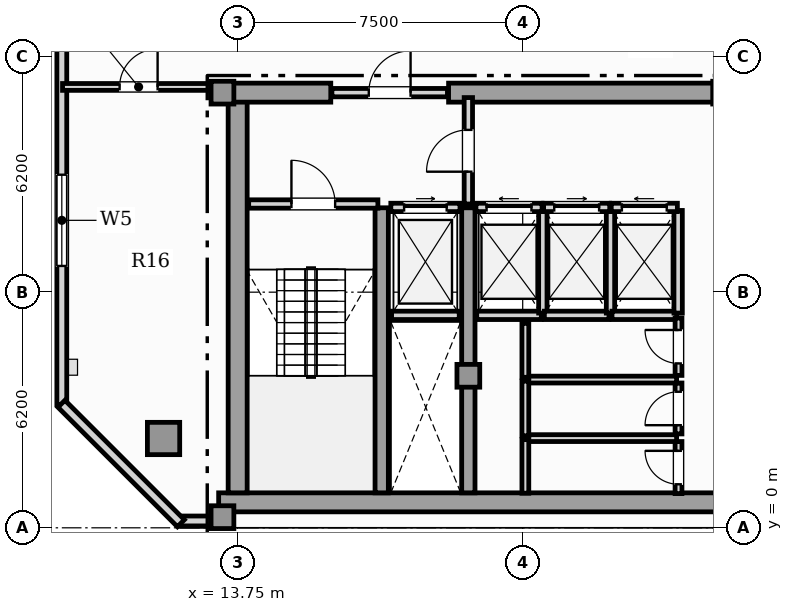
"""IFC4 building model, lengths in metres.
Left out: names, types, materials, properties, quantities, classifications, styles, units other than length and angle.
Written with IfcOpenShell. Run it as: python <this file> out.ifc"""

import sys

from ifc_helpers import new_model, si_unit, direction, frame, frame_2d, origin, origin_2d, place, context, subcontext, project, spatial, rectangle, hollow_rectangle, extrude, element, fill, save


model = new_model("IFC4")
c1 = context("Model", 3, precision=1e-05, world=origin(), true_north=direction((0.0, 1.0)))
c2 = subcontext(c1, "Body", "Model", "MODEL_VIEW")
j1 = project(units=[si_unit("LENGTHUNIT", "METRE"), si_unit("PLANEANGLEUNIT", "RADIAN")], contexts=[c1])
p1 = place(None, origin())
s1 = spatial("IfcSite", under=j1, at=p1, CompositionType="ELEMENT")
p2 = place(p1, origin())
s2 = spatial("IfcBuilding", under=s1, at=p2, CompositionType="ELEMENT")
p3 = place(p2, frame((0.0, 0.0, 316.9)))
s3 = spatial("IfcBuildingStorey", under=s2, at=p3, CompositionType="ELEMENT", Elevation=316.9)
p4 = place(p3, frame((13.25, 0.67, 0.0), z_axis=(0.0, 0.0, 1.0), x_axis=(1.0, 0.0, 0.0)))
e1 = element("IfcWall", 1, at=p4, inside=s3, PredefinedType="SHEAR", context=c2, shape_type="SweptSolid", body=[
    extrude(rectangle(XDim=31.0, YDim=0.5, at=frame_2d((15.5, 0.0))), origin(), (0.0, 0.0, 1.0), 3.65),
])
p5 = place(p3, frame((13.75, 0.92, 0.0), z_axis=(0.0, 0.0, 1.0), x_axis=(0.0, 1.0, 0.0)))
e2 = element("IfcWall", 2, at=p5, inside=s3, PredefinedType="SHEAR", context=c2, shape_type="SweptSolid", body=[
    extrude(rectangle(XDim=10.53, YDim=0.5, at=frame_2d((5.265, 0.0))), origin(), (0.0, 0.0, 1.0), 3.65),
])
p6 = place(p3, frame((13.25, 11.45, 0.0), z_axis=(0.0, 0.0, 1.0), x_axis=(1.0, 0.0, 0.0)))
e3 = element("IfcWall", 3, at=p6, inside=s3, PredefinedType="SHEAR", context=c2, shape_type="SweptSolid", body=[
    extrude(rectangle(XDim=2.95, YDim=0.5, at=frame_2d((1.475, 0.0))), origin(), (0.0, 0.0, 1.0), 3.65),
])
p7 = place(p3, frame((19.3, 11.45, 0.0), z_axis=(0.0, 0.0, 1.0), x_axis=(1.0, 0.0, 0.0)))
e4 = element("IfcWall", 4, at=p7, inside=s3, PredefinedType="SHEAR", context=c2, shape_type="SweptSolid", body=[
    extrude(rectangle(XDim=7.3, YDim=0.5, at=frame_2d((3.65, 0.0))), origin(), (0.0, 0.0, 1.0), 3.65),
])
for number, where, z_axis, x_axis in (
    (5, (17.54, 0.92, 0.0), (0.0, 0.0, 1.0), (0.0, 1.0, 0.0)),
    (6, (19.82, 0.92, 0.0), (0.0, 0.0, 1.0), (0.0, 1.0, 0.0)),
):
    element("IfcWall", number, at=place(p3, frame(where, z_axis=z_axis, x_axis=x_axis)), inside=s3, PredefinedType="SHEAR", context=c2, shape_type="SweptSolid", body=[
        extrude(rectangle(XDim=7.5, YDim=0.35, at=frame_2d((3.75, 0.0))), origin(), (0.0, 0.0, 1.0), 3.65),
    ])
for number, where, z_axis, x_axis in (
    (7, (13.35, 0.28, 0.0), (0.0, 0.0, 1.0), (1.0, 0.0, 0.0)),
    (8, (13.35, 11.45, 0.0), (0.0, 0.0, 1.0), (1.0, 0.0, 0.0)),
    (9, (19.82, 4.0, 0.0), (0.0, 0.0, 1.0), (1.0, 0.0, 0.0)),
    (10, (26.55, 11.45, 0.0), (0.0, 0.0, 1.0), (1.0, 0.0, 0.0)),
):
    element("IfcColumn", number, at=place(p3, frame(where, z_axis=z_axis, x_axis=x_axis)), inside=s3, PredefinedType="COLUMN", context=c2, shape_type="SweptSolid", body=[
        extrude(rectangle(XDim=0.6, YDim=0.6, at=origin_2d()), origin(), (0.0, 0.0, 1.0), 3.85),
    ])
p8 = place(p3, frame((11.8, 2.35, 0.0), z_axis=(0.0, 0.0, 1.0), x_axis=(1.0, 0.0, 0.0)))
e11 = element("IfcColumn", 11, at=p8, inside=s3, PredefinedType="USERDEFINED", context=c2, shape_type="SweptSolid", body=[
    extrude(hollow_rectangle(XDim=0.85, YDim=0.85, WallThickness=0.05, at=origin_2d()), origin(), (0.0, 0.0, 1.0), 3.85),
])
p9 = place(p3, frame((12.233, 0.18, 0.0), z_axis=(0.0, 0.0, 1.0), x_axis=(1.0, 0.0, 0.0)))
e12 = element("IfcWall", 12, at=p9, inside=s3, PredefinedType="SOLIDWALL", context=c2, shape_type="SweptSolid", body=[
    extrude(rectangle(XDim=1.017, YDim=0.26, at=frame_2d((0.509, 0.0))), origin(), (0.0, 0.0, 1.0), 3.65),
])
p10 = place(p3, frame((9.123, 29.642, 0.0), z_axis=(0.0, 0.0, 1.0), x_axis=(0.0, -1.0, 0.0)))
e13 = element("IfcWall", 13, at=p10, inside=s3, PredefinedType="SOLIDWALL", context=c2, shape_type="SweptSolid", body=[
    extrude(rectangle(XDim=26.402, YDim=0.26, at=frame_2d((13.201, 0.0))), origin(), (0.0, 0.0, 1.0), 3.65),
])
p11 = place(p10, frame((20.352, 0.0, 0.85)))
e14 = element("IfcOpeningElement", 14, at=p11, cuts=e13, PredefinedType="OPENING", context=c2, shape_type="SweptSolid", body=[
    extrude(rectangle(XDim=2.4, YDim=2.0, at=frame_2d((1.2, 1.0))), frame((0.0, 0.14, 0.0), z_axis=(0.0, -1.0, 0.0), x_axis=(1.0, 0.0, 0.0)), (0.0, 0.0, 1.0), 0.28),
])
p12 = place(p10, frame((10.19, 0.0, 0.88)))
e15 = element("IfcOpeningElement", 15, at=p12, cuts=e13, PredefinedType="OPENING", context=c2, shape_type="SweptSolid", body=[
    extrude(rectangle(XDim=1.65, YDim=2.0, at=frame_2d((0.825, 1.0))), frame((0.0, 0.14, 0.0), z_axis=(0.0, -1.0, 0.0), x_axis=(1.0, 0.0, 0.0)), (0.0, 0.0, 1.0), 0.28),
])
p13 = place(p10, frame((7.34, 0.0, 0.88)))
e16 = element("IfcOpeningElement", 16, at=p13, cuts=e13, PredefinedType="OPENING", context=c2, shape_type="SweptSolid", body=[
    extrude(rectangle(XDim=1.65, YDim=2.0, at=frame_2d((0.825, 1.0))), frame((0.0, 0.14, 0.0), z_axis=(0.0, -1.0, 0.0), x_axis=(1.0, 0.0, 0.0)), (0.0, 0.0, 1.0), 0.28),
])
p14 = place(p10, frame((3.721, 0.0, 0.88)))
e17 = element("IfcOpeningElement", 17, at=p14, cuts=e13, PredefinedType="OPENING", context=c2, shape_type="SweptSolid", body=[
    extrude(rectangle(XDim=1.65, YDim=2.0, at=frame_2d((0.825, 1.0))), frame((0.0, 0.14, 0.0), z_axis=(0.0, -1.0, 0.0), x_axis=(1.0, 0.0, 0.0)), (0.0, 0.0, 1.0), 0.28),
])
p15 = place(p3, frame((9.113, 3.264, 0.0), z_axis=(0.0, 0.0, 1.0), x_axis=(0.707079321262, -0.707134240044, 0.0)))
e18 = element("IfcWall", 18, at=p15, inside=s3, PredefinedType="SOLIDWALL", context=c2, shape_type="SweptSolid", body=[
    extrude(rectangle(XDim=4.446, YDim=0.26, at=frame_2d((2.223, 0.0))), origin(), (0.0, 0.0, 1.0), 3.65),
])
p16 = place(p3, frame((17.8, 5.59, 0.0), z_axis=(0.0, 0.0, 1.0), x_axis=(1.0, 0.0, 0.0)))
e19 = element("IfcWall", 19, at=p16, inside=s3, PredefinedType="SOLIDWALL", context=c2, shape_type="SweptSolid", body=[
    extrude(rectangle(XDim=1.78, YDim=0.22, at=frame_2d((0.89, 0.0))), origin(), (0.0, 0.0, 1.0), 3.65),
])
p17 = place(p3, frame((17.78, 8.43, 0.0), z_axis=(0.0, 0.0, 1.0), x_axis=(1.0, 0.0, 0.0)))
e20 = element("IfcWall", 20, at=p17, inside=s3, PredefinedType="SOLIDWALL", context=c2, shape_type="SweptSolid", body=[
    extrude(rectangle(XDim=1.82, YDim=0.22, at=frame_2d((0.91, 0.0))), origin(), (0.0, 0.0, 1.0), 3.65),
])
p18 = place(p17, frame((0.35, 0.0, 0.0)))
e21 = element("IfcOpeningElement", 21, at=p18, cuts=e20, PredefinedType="OPENING", context=c2, shape_type="SweptSolid", body=[
    extrude(rectangle(XDim=1.12, YDim=2.25, at=frame_2d((0.56, 1.125))), frame((0.0, 0.12, 0.0), z_axis=(0.0, -1.0, 0.0), x_axis=(1.0, 0.0, 0.0)), (0.0, 0.0, 1.0), 0.24),
])
p19 = place(p3, frame((20.04, 5.59, 0.0), z_axis=(0.0, 0.0, 1.0), x_axis=(1.0, 0.0, 0.0)))
e22 = element("IfcWall", 22, at=p19, inside=s3, PredefinedType="SOLIDWALL", context=c2, shape_type="SweptSolid", body=[
    extrude(rectangle(XDim=1.7, YDim=0.22, at=frame_2d((0.85, 0.0))), origin(), (0.0, 0.0, 1.0), 3.65),
])
p20 = place(p3, frame((21.78, 5.65, 0.0), z_axis=(0.0, 0.0, 1.0), x_axis=(0.0, 1.0, 0.0)))
e23 = element("IfcWall", 23, at=p20, inside=s3, PredefinedType="SOLIDWALL", context=c2, shape_type="SweptSolid", body=[
    extrude(rectangle(XDim=2.7, YDim=0.22, at=frame_2d((1.35, 0.0))), origin(), (0.0, 0.0, 1.0), 3.65),
])
p21 = place(p3, frame((20.02, 8.43, 0.0), z_axis=(0.0, 0.0, 1.0), x_axis=(1.0, 0.0, 0.0)))
e24 = element("IfcWall", 24, at=p21, inside=s3, PredefinedType="SOLIDWALL", context=c2, shape_type="SweptSolid", body=[
    extrude(rectangle(XDim=1.74, YDim=0.22, at=frame_2d((0.87, 0.0))), origin(), (0.0, 0.0, 1.0), 3.65),
])
p22 = place(p21, frame((0.28, 0.0, 0.0)))
e25 = element("IfcOpeningElement", 25, at=p22, cuts=e24, PredefinedType="OPENING", context=c2, shape_type="SweptSolid", body=[
    extrude(rectangle(XDim=1.18, YDim=2.2, at=frame_2d((0.59, 1.1))), frame((0.0, 0.12, 0.0), z_axis=(0.0, -1.0, 0.0), x_axis=(1.0, 0.0, 0.0)), (0.0, 0.0, 1.0), 0.24),
])
p23 = place(p3, frame((21.82, 5.59, 0.0), z_axis=(0.0, 0.0, 1.0), x_axis=(1.0, 0.0, 0.0)))
e26 = element("IfcWall", 26, at=p23, inside=s3, PredefinedType="SOLIDWALL", context=c2, shape_type="SweptSolid", body=[
    extrude(rectangle(XDim=1.7, YDim=0.22, at=frame_2d((0.85, 0.0))), origin(), (0.0, 0.0, 1.0), 3.65),
])
p24 = place(p3, frame((23.56, 5.65, 0.0), z_axis=(0.0, 0.0, 1.0), x_axis=(0.0, 1.0, 0.0)))
e27 = element("IfcWall", 27, at=p24, inside=s3, PredefinedType="SOLIDWALL", context=c2, shape_type="SweptSolid", body=[
    extrude(rectangle(XDim=2.7, YDim=0.22, at=frame_2d((1.35, 0.0))), origin(), (0.0, 0.0, 1.0), 3.65),
])
p25 = place(p3, frame((21.8, 8.43, 0.0), z_axis=(0.0, 0.0, 1.0), x_axis=(1.0, 0.0, 0.0)))
e28 = element("IfcWall", 28, at=p25, inside=s3, PredefinedType="SOLIDWALL", context=c2, shape_type="SweptSolid", body=[
    extrude(rectangle(XDim=1.74, YDim=0.22, at=frame_2d((0.87, 0.0))), origin(), (0.0, 0.0, 1.0), 3.65),
])
p26 = place(p25, frame((0.28, 0.0, 0.0)))
e29 = element("IfcOpeningElement", 29, at=p26, cuts=e28, PredefinedType="OPENING", context=c2, shape_type="SweptSolid", body=[
    extrude(rectangle(XDim=1.18, YDim=2.2, at=frame_2d((0.59, 1.1))), frame((0.0, 0.12, 0.0), z_axis=(0.0, -1.0, 0.0), x_axis=(1.0, 0.0, 0.0)), (0.0, 0.0, 1.0), 0.24),
])
p27 = place(p3, frame((23.6, 5.59, 0.0), z_axis=(0.0, 0.0, 1.0), x_axis=(1.0, 0.0, 0.0)))
e30 = element("IfcWall", 30, at=p27, inside=s3, PredefinedType="SOLIDWALL", context=c2, shape_type="SweptSolid", body=[
    extrude(rectangle(XDim=1.7, YDim=0.22, at=frame_2d((0.85, 0.0))), origin(), (0.0, 0.0, 1.0), 3.65),
])
p28 = place(p3, frame((25.34, 5.65, 0.0), z_axis=(0.0, 0.0, 1.0), x_axis=(0.0, 1.0, 0.0)))
e31 = element("IfcWall", 31, at=p28, inside=s3, PredefinedType="SOLIDWALL", context=c2, shape_type="SweptSolid", body=[
    extrude(rectangle(XDim=2.7, YDim=0.22, at=frame_2d((1.35, 0.0))), origin(), (0.0, 0.0, 1.0), 3.65),
])
p29 = place(p3, frame((23.58, 8.43, 0.0), z_axis=(0.0, 0.0, 1.0), x_axis=(1.0, 0.0, 0.0)))
e32 = element("IfcWall", 32, at=p29, inside=s3, PredefinedType="SOLIDWALL", context=c2, shape_type="SweptSolid", body=[
    extrude(rectangle(XDim=1.74, YDim=0.22, at=frame_2d((0.87, 0.0))), origin(), (0.0, 0.0, 1.0), 3.65),
])
p30 = place(p29, frame((0.28, 0.0, 0.0)))
e33 = element("IfcOpeningElement", 33, at=p30, cuts=e32, PredefinedType="OPENING", context=c2, shape_type="SweptSolid", body=[
    extrude(rectangle(XDim=1.18, YDim=2.2, at=frame_2d((0.59, 1.1))), frame((0.0, 0.12, 0.0), z_axis=(0.0, -1.0, 0.0), x_axis=(1.0, 0.0, 0.0)), (0.0, 0.0, 1.0), 0.24),
])
p31 = place(p3, frame((14.04, 8.52, 0.0), z_axis=(0.0, 0.0, 1.0), x_axis=(1.0, 0.0, 0.0)))
e34 = element("IfcWall", 34, at=p31, inside=s3, PredefinedType="SOLIDWALL", context=c2, shape_type="SweptSolid", body=[
    extrude(rectangle(XDim=3.4, YDim=0.22, at=frame_2d((1.7, 0.0))), origin(), (0.0, 0.0, 1.0), 3.65),
])
p32 = place(p31, frame((1.125, 0.0, 0.0)))
e35 = element("IfcOpeningElement", 35, at=p32, cuts=e34, PredefinedType="OPENING", context=c2, shape_type="SweptSolid", body=[
    extrude(rectangle(XDim=1.15, YDim=2.2, at=frame_2d((0.575, 1.1))), frame((0.0, 0.12, 0.0), z_axis=(0.0, -1.0, 0.0), x_axis=(1.0, 0.0, 0.0)), (0.0, 0.0, 1.0), 0.24),
])
p33 = place(p3, frame((19.82, 8.52, 0.0), z_axis=(0.0, 0.0, 1.0), x_axis=(0.0, 1.0, 0.0)))
e36 = element("IfcWall", 36, at=p33, inside=s3, PredefinedType="SOLIDWALL", context=c2, shape_type="SweptSolid", body=[
    extrude(rectangle(XDim=2.8, YDim=0.22, at=frame_2d((1.4, 0.0))), origin(), (0.0, 0.0, 1.0), 3.106),
])
p34 = place(p33, frame((0.85, 0.0, 0.0)))
e37 = element("IfcOpeningElement", 37, at=p34, cuts=e36, PredefinedType="OPENING", context=c2, shape_type="SweptSolid", body=[
    extrude(rectangle(XDim=1.1, YDim=2.2, at=frame_2d((0.55, 1.1))), frame((0.0, 0.12, 0.0), z_axis=(0.0, -1.0, 0.0), x_axis=(1.0, 0.0, 0.0)), (0.0, 0.0, 1.0), 0.24),
])
p35 = place(p3, frame((16.23, 11.45, 0.0), z_axis=(0.0, 0.0, 1.0), x_axis=(1.0, 0.0, 0.0)))
e38 = element("IfcWall", 38, at=p35, inside=s3, PredefinedType="SOLIDWALL", context=c2, shape_type="SweptSolid", body=[
    extrude(rectangle(XDim=3.04, YDim=0.22, at=frame_2d((1.52, 0.0))), origin(), (0.0, 0.0, 1.0), 3.65),
])
p36 = place(p35, frame((0.97, 0.0, 0.0)))
e39 = element("IfcOpeningElement", 39, at=p36, cuts=e38, PredefinedType="OPENING", context=c2, shape_type="SweptSolid", body=[
    extrude(rectangle(XDim=1.1, YDim=2.2, at=frame_2d((0.55, 1.1))), frame((0.0, 0.12, 0.0), z_axis=(0.0, -1.0, 0.0), x_axis=(1.0, 0.0, 0.0)), (0.0, 0.0, 1.0), 0.24),
])
p37 = place(p3, frame((25.35, 0.9, 0.0), z_axis=(0.0, 0.0, 1.0), x_axis=(0.0, 1.0, 0.0)))
e40 = element("IfcWall", 40, at=p37, inside=s3, PredefinedType="PARTITIONING", context=c2, shape_type="SweptSolid", body=[
    extrude(rectangle(XDim=1.37, YDim=0.18, at=frame_2d((0.685, 0.0))), origin(), (0.0, 0.0, 1.0), 3.65),
])
p38 = place(p37, frame((0.245, 0.0, 0.0)))
e41 = element("IfcOpeningElement", 41, at=p38, cuts=e40, PredefinedType="OPENING", context=c2, shape_type="SweptSolid", body=[
    extrude(rectangle(XDim=0.88, YDim=2.05, at=frame_2d((0.44, 1.025))), frame((0.0, 0.1, 0.0), z_axis=(0.0, -1.0, 0.0), x_axis=(1.0, 0.0, 0.0)), (0.0, 0.0, 1.0), 0.2),
])
p39 = place(p3, frame((21.36, 2.36, 0.0), z_axis=(0.0, 0.0, 1.0), x_axis=(1.0, 0.0, 0.0)))
e42 = element("IfcWall", 42, at=p39, inside=s3, PredefinedType="PARTITIONING", context=c2, shape_type="SweptSolid", body=[
    extrude(rectangle(XDim=3.94, YDim=0.18, at=frame_2d((1.97, 0.0))), origin(), (0.0, 0.0, 1.0), 3.65),
])
p40 = place(p3, frame((21.32, 0.91, 0.0), z_axis=(0.0, 0.0, 1.0), x_axis=(0.0, 1.0, 0.0)))
e43 = element("IfcWall", 43, at=p40, inside=s3, PredefinedType="PARTITIONING", context=c2, shape_type="SweptSolid", body=[
    extrude(rectangle(XDim=1.41, YDim=0.18, at=frame_2d((0.705, 0.0))), origin(), (0.0, 0.0, 1.0), 3.65),
])
p41 = place(p3, frame((25.35, 2.47, 0.0), z_axis=(0.0, 0.0, 1.0), x_axis=(0.0, 1.0, 0.0)))
e44 = element("IfcWall", 44, at=p41, inside=s3, PredefinedType="PARTITIONING", context=c2, shape_type="SweptSolid", body=[
    extrude(rectangle(XDim=1.34, YDim=0.18, at=frame_2d((0.67, 0.0))), origin(), (0.0, 0.0, 1.0), 3.65),
])
p42 = place(p41, frame((0.23, 0.0, 0.0)))
e45 = element("IfcOpeningElement", 45, at=p42, cuts=e44, PredefinedType="OPENING", context=c2, shape_type="SweptSolid", body=[
    extrude(rectangle(XDim=0.88, YDim=2.05, at=frame_2d((0.44, 1.025))), frame((0.0, 0.1, 0.0), z_axis=(0.0, -1.0, 0.0), x_axis=(1.0, 0.0, 0.0)), (0.0, 0.0, 1.0), 0.2),
])
p43 = place(p3, frame((21.36, 3.9, 0.0), z_axis=(0.0, 0.0, 1.0), x_axis=(1.0, 0.0, 0.0)))
e46 = element("IfcWall", 46, at=p43, inside=s3, PredefinedType="PARTITIONING", context=c2, shape_type="SweptSolid", body=[
    extrude(rectangle(XDim=3.94, YDim=0.18, at=frame_2d((1.97, 0.0))), origin(), (0.0, 0.0, 1.0), 3.65),
])
p44 = place(p3, frame((21.32, 2.42, 0.0), z_axis=(0.0, 0.0, 1.0), x_axis=(0.0, 1.0, 0.0)))
e47 = element("IfcWall", 47, at=p44, inside=s3, PredefinedType="PARTITIONING", context=c2, shape_type="SweptSolid", body=[
    extrude(rectangle(XDim=1.44, YDim=0.18, at=frame_2d((0.72, 0.0))), origin(), (0.0, 0.0, 1.0), 3.65),
])
p45 = place(p3, frame((25.35, 4.01, 0.0), z_axis=(0.0, 0.0, 1.0), x_axis=(0.0, 1.0, 0.0)))
e48 = element("IfcWall", 48, at=p45, inside=s3, PredefinedType="PARTITIONING", context=c2, shape_type="SweptSolid", body=[
    extrude(rectangle(XDim=1.51, YDim=0.18, at=frame_2d((0.755, 0.0))), origin(), (0.0, 0.0, 1.0), 3.65),
])
p46 = place(p45, frame((0.315, 0.0, 0.0)))
e49 = element("IfcOpeningElement", 49, at=p46, cuts=e48, PredefinedType="OPENING", context=c2, shape_type="SweptSolid", body=[
    extrude(rectangle(XDim=0.88, YDim=2.05, at=frame_2d((0.44, 1.025))), frame((0.0, 0.1, 0.0), z_axis=(0.0, -1.0, 0.0), x_axis=(1.0, 0.0, 0.0)), (0.0, 0.0, 1.0), 0.2),
])
p47 = place(p3, frame((21.32, 3.96, 0.0), z_axis=(0.0, 0.0, 1.0), x_axis=(0.0, 1.0, 0.0)))
e50 = element("IfcWall", 50, at=p47, inside=s3, PredefinedType="PARTITIONING", context=c2, shape_type="SweptSolid", body=[
    extrude(rectangle(XDim=1.42, YDim=0.18, at=frame_2d((0.71, 0.0))), origin(), (0.0, 0.0, 1.0), 3.65),
])
p48 = place(p3, frame((9.143, 11.6, 0.0), z_axis=(0.0, 0.0, 1.0), x_axis=(1.0, 0.0, 0.0)))
e51 = element("IfcWall", 51, at=p48, inside=s3, PredefinedType="PARTITIONING", context=c2, shape_type="SweptSolid", body=[
    extrude(rectangle(XDim=4.002, YDim=0.18, at=frame_2d((2.001, 0.0))), origin(), (0.0, 0.0, 1.0), 3.65),
])
p49 = place(p48, frame((1.501, 0.0, 0.0)))
e52 = element("IfcOpeningElement", 52, at=p49, cuts=e51, PredefinedType="OPENING", context=c2, shape_type="SweptSolid", body=[
    extrude(rectangle(XDim=1.0, YDim=2.15, at=frame_2d((0.5, 1.075))), frame((0.0, 0.1, 0.0), z_axis=(0.0, -1.0, 0.0), x_axis=(1.0, 0.0, 0.0)), (0.0, 0.0, 1.0), 0.2),
])
p50 = place(p11, origin())
e53 = element("IfcWindow", 53, at=p50, inside=s3, PartitioningType="SINGLE_PANEL", PredefinedType="WINDOW", context=c2, shape_type="SweptSolid", body=[
    extrude(rectangle(XDim=2.4, YDim=2.0, at=frame_2d((1.2, 1.0))), frame((0.0, 0.03, 0.0), z_axis=(0.0, -1.0, 0.0), x_axis=(1.0, 0.0, 0.0)), (0.0, 0.0, 1.0), 0.06),
])
fill(e14, e53)
p51 = place(p18, origin())
e54 = element("IfcDoor", 54, at=p51, inside=s3, OperationType="SLIDING_TO_RIGHT", PredefinedType="DOOR", context=c2, shape_type="SweptSolid", body=[
    extrude(rectangle(XDim=1.12, YDim=2.25, at=frame_2d((0.56, 1.125))), frame((0.0, 0.025, 0.0), z_axis=(0.0, -1.0, 0.0), x_axis=(1.0, 0.0, 0.0)), (0.0, 0.0, 1.0), 0.05),
])
fill(e21, e54)
p52 = place(p22, origin())
e55 = element("IfcDoor", 55, at=p52, inside=s3, OperationType="SLIDING_TO_LEFT", PredefinedType="DOOR", context=c2, shape_type="SweptSolid", body=[
    extrude(rectangle(XDim=1.18, YDim=2.2, at=frame_2d((0.59, 1.1))), frame((0.0, 0.025, 0.0), z_axis=(0.0, -1.0, 0.0), x_axis=(1.0, 0.0, 0.0)), (0.0, 0.0, 1.0), 0.05),
])
fill(e25, e55)
p53 = place(p26, origin())
e56 = element("IfcDoor", 56, at=p53, inside=s3, OperationType="SLIDING_TO_RIGHT", PredefinedType="DOOR", context=c2, shape_type="SweptSolid", body=[
    extrude(rectangle(XDim=1.18, YDim=2.2, at=frame_2d((0.59, 1.1))), frame((0.0, 0.025, 0.0), z_axis=(0.0, -1.0, 0.0), x_axis=(1.0, 0.0, 0.0)), (0.0, 0.0, 1.0), 0.05),
])
fill(e29, e56)
p54 = place(p30, origin())
e57 = element("IfcDoor", 57, at=p54, inside=s3, OperationType="SLIDING_TO_LEFT", PredefinedType="DOOR", context=c2, shape_type="SweptSolid", body=[
    extrude(rectangle(XDim=1.18, YDim=2.2, at=frame_2d((0.59, 1.1))), frame((0.0, 0.025, 0.0), z_axis=(0.0, -1.0, 0.0), x_axis=(1.0, 0.0, 0.0)), (0.0, 0.0, 1.0), 0.05),
])
fill(e33, e57)
p55 = place(p32, origin())
e58 = element("IfcDoor", 58, at=p55, inside=s3, OperationType="SINGLE_SWING_LEFT", PredefinedType="DOOR", context=c2, shape_type="SweptSolid", body=[
    extrude(rectangle(XDim=1.15, YDim=2.2, at=frame_2d((0.575, 1.1))), frame((0.0, 0.025, 0.0), z_axis=(0.0, -1.0, 0.0), x_axis=(1.0, 0.0, 0.0)), (0.0, 0.0, 1.0), 0.05),
])
fill(e35, e58)
p56 = place(p34, origin())
e59 = element("IfcDoor", 59, at=p56, inside=s3, OperationType="SINGLE_SWING_LEFT", PredefinedType="DOOR", context=c2, shape_type="SweptSolid", body=[
    extrude(rectangle(XDim=1.1, YDim=2.2, at=frame_2d((0.55, 1.1))), frame((0.0, 0.025, 0.0), z_axis=(0.0, -1.0, 0.0), x_axis=(1.0, 0.0, 0.0)), (0.0, 0.0, 1.0), 0.05),
])
fill(e37, e59)
p57 = place(p36, origin())
e60 = element("IfcDoor", 60, at=p57, inside=s3, OperationType="SINGLE_SWING_RIGHT", PredefinedType="DOOR", context=c2, shape_type="SweptSolid", body=[
    extrude(rectangle(XDim=1.1, YDim=2.2, at=frame_2d((0.55, 1.1))), frame((0.0, 0.025, 0.0), z_axis=(0.0, -1.0, 0.0), x_axis=(1.0, 0.0, 0.0)), (0.0, 0.0, 1.0), 0.05),
])
fill(e39, e60)
p58 = place(p38, origin())
e61 = element("IfcDoor", 61, at=p58, inside=s3, OperationType="SINGLE_SWING_RIGHT", PredefinedType="DOOR", context=c2, shape_type="SweptSolid", body=[
    extrude(rectangle(XDim=0.88, YDim=2.05, at=frame_2d((0.44, 1.025))), frame((0.0, 0.025, 0.0), z_axis=(0.0, -1.0, 0.0), x_axis=(1.0, 0.0, 0.0)), (0.0, 0.0, 1.0), 0.05),
])
fill(e41, e61)
p59 = place(p42, origin())
e62 = element("IfcDoor", 62, at=p59, inside=s3, OperationType="SINGLE_SWING_LEFT", PredefinedType="DOOR", context=c2, shape_type="SweptSolid", body=[
    extrude(rectangle(XDim=0.88, YDim=2.05, at=frame_2d((0.44, 1.025))), frame((0.0, 0.025, 0.0), z_axis=(0.0, -1.0, 0.0), x_axis=(1.0, 0.0, 0.0)), (0.0, 0.0, 1.0), 0.05),
])
fill(e45, e62)
p60 = place(p46, origin())
e63 = element("IfcDoor", 63, at=p60, inside=s3, OperationType="SINGLE_SWING_RIGHT", PredefinedType="DOOR", context=c2, shape_type="SweptSolid", body=[
    extrude(rectangle(XDim=0.88, YDim=2.05, at=frame_2d((0.44, 1.025))), frame((0.0, 0.025, 0.0), z_axis=(0.0, -1.0, 0.0), x_axis=(1.0, 0.0, 0.0)), (0.0, 0.0, 1.0), 0.05),
])
fill(e49, e63)
p61 = place(p49, origin())
e64 = element("IfcDoor", 64, at=p61, inside=s3, OperationType="SINGLE_SWING_RIGHT", PredefinedType="DOOR", context=c2, shape_type="SweptSolid", body=[
    extrude(rectangle(XDim=1.0, YDim=2.15, at=frame_2d((0.5, 1.075))), frame((0.0, 0.025, 0.0), z_axis=(0.0, -1.0, 0.0), x_axis=(1.0, 0.0, 0.0)), (0.0, 0.0, 1.0), 0.05),
])
fill(e52, e64)
save(model, sys.argv[1])
